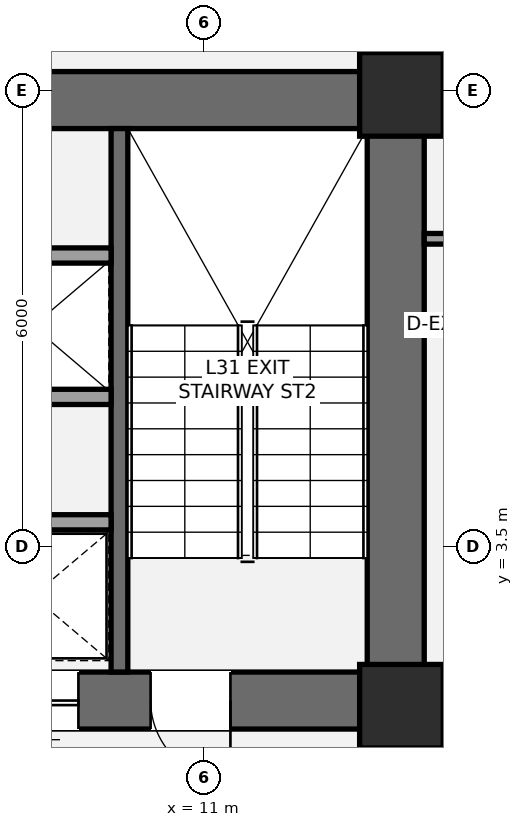
"""IFC4 building model, lengths in metres.
Left out: names, types, materials, properties, quantities, classifications, styles, units other than length and angle.
Written with IfcOpenShell. Run it as: python <this file> out.ifc"""

import sys

from ifc_helpers import new_model, si_unit, direction, frame, frame_2d, origin, origin_2d, place, context, subcontext, project, spatial, rectangle, extrude, element, fill, save


model = new_model("IFC4")
c1 = context("Model", 3, precision=1e-05, world=origin(), true_north=direction((0.0, 1.0)))
c2 = subcontext(c1, "Body", "Model", "MODEL_VIEW")
j1 = project(units=[si_unit("LENGTHUNIT", "METRE"), si_unit("PLANEANGLEUNIT", "RADIAN")], contexts=[c1])
p1 = place(None, origin())
s1 = spatial("IfcSite", under=j1, at=p1, CompositionType="ELEMENT")
p2 = place(p1, origin())
s2 = spatial("IfcBuilding", under=s1, at=p2, CompositionType="ELEMENT")
p3 = place(p2, frame((0.0, 0.0, 117.6)))
s3 = spatial("IfcBuildingStorey", under=s2, at=p3, CompositionType="ELEMENT", Elevation=117.6)
p4 = place(p3, frame((13.525, 1.1, 0.0), z_axis=(0.0, 0.0, 1.0), x_axis=(0.0, 1.0, 0.0)))
e1 = element("IfcWall", 1, at=p4, inside=s3, PredefinedType="SHEAR", context=c2, shape_type="SweptSolid", body=[
    extrude(rectangle(XDim=8.65, YDim=0.75, at=frame_2d((4.325, 0.0))), origin(), (0.0, 0.0, 1.0), 3.5),
])
p5 = place(p3, frame((4.425, 9.375, 0.0), z_axis=(0.0, 0.0, 1.0), x_axis=(1.0, 0.0, 0.0)))
e2 = element("IfcWall", 2, at=p5, inside=s3, PredefinedType="SHEAR", context=c2, shape_type="SweptSolid", body=[
    extrude(rectangle(XDim=9.475, YDim=0.75, at=frame_2d((4.737, 0.0))), origin(), (0.0, 0.0, 1.0), 3.5),
])
p6 = place(p3, frame((13.9, 1.475, 0.0), z_axis=(0.0, 0.0, 1.0), x_axis=(-1.0, 0.0, 0.0)))
e3 = element("IfcWall", 3, at=p6, inside=s3, PredefinedType="SHEAR", context=c2, shape_type="SweptSolid", body=[
    extrude(rectangle(XDim=9.075, YDim=0.75, at=frame_2d((4.538, 0.0))), origin(), (0.0, 0.0, 1.0), 3.5),
])
p7 = place(p6, frame((2.55, 0.0, 0.0)))
e4 = element("IfcOpeningElement", 4, at=p7, cuts=e3, PredefinedType="OPENING", context=c2, shape_type="SweptSolid", body=[
    extrude(rectangle(XDim=1.05, YDim=2.15, at=frame_2d((0.525, 1.075))), frame((0.0, 0.385, 0.0), z_axis=(0.0, -1.0, 0.0), x_axis=(1.0, 0.0, 0.0)), (0.0, 0.0, 1.0), 0.77),
])
p8 = place(p6, frame((4.55, 0.0, 0.0)))
e5 = element("IfcOpeningElement", 5, at=p8, cuts=e3, PredefinedType="OPENING", context=c2, shape_type="SweptSolid", body=[
    extrude(rectangle(XDim=1.1, YDim=2.2, at=frame_2d((0.55, 1.1))), frame((0.0, 0.385, 0.0), z_axis=(0.0, -1.0, 0.0), x_axis=(1.0, 0.0, 0.0)), (0.0, 0.0, 1.0), 0.77),
])
p9 = place(p3, frame((9.89, 1.85, 0.0), z_axis=(0.0, 0.0, 1.0), x_axis=(0.0, 1.0, 0.0)))
e6 = element("IfcWall", 6, at=p9, inside=s3, PredefinedType="SHEAR", context=c2, shape_type="SweptSolid", body=[
    extrude(rectangle(XDim=7.15, YDim=0.22, at=frame_2d((3.575, 0.0))), origin(), (0.0, 0.0, 1.0), 3.5),
])
for number, where, z_axis, x_axis in (
    (7, (13.6, 1.4, 0.0), (0.0, 0.0, 1.0), (1.0, 0.0, 0.0)),
    (8, (13.6, 9.45, 0.0), (0.0, 0.0, 1.0), (1.0, 0.0, 0.0)),
):
    element("IfcColumn", number, at=place(p3, frame(where, z_axis=z_axis, x_axis=x_axis)), inside=s3, PredefinedType="COLUMN", context=c2, shape_type="SweptSolid", body=[
        extrude(rectangle(XDim=1.1, YDim=1.1, at=origin_2d()), origin(), (0.0, 0.0, 1.0), 3.5),
    ])
p10 = place(p3, frame((13.45, -2.15, 0.0), z_axis=(0.0, 0.0, 1.0), x_axis=(0.0, 1.0, 0.0)))
e9 = element("IfcWall", 9, at=p10, inside=s3, PredefinedType="PARTITIONING", context=c2, shape_type="SweptSolid", body=[
    extrude(rectangle(XDim=3.3, YDim=0.165, at=frame_2d((1.65, 0.0))), origin(), (0.0, 0.0, 1.0), 2.763),
])
p11 = place(p10, frame((1.15, 0.0, 0.0)))
e10 = element("IfcOpeningElement", 10, at=p11, cuts=e9, PredefinedType="OPENING", context=c2, shape_type="SweptSolid", body=[
    extrude(rectangle(XDim=1.05, YDim=2.15, at=frame_2d((0.525, 1.075))), frame((0.0, 0.093, 0.0), z_axis=(0.0, -1.0, 0.0), x_axis=(1.0, 0.0, 0.0)), (0.0, 0.0, 1.0), 0.185),
])
p12 = place(p3, frame((5.575, 3.82, 0.0), z_axis=(0.0, 0.0, 1.0), x_axis=(1.0, 0.0, 0.0)))
e11 = element("IfcWall", 11, at=p12, inside=s3, PredefinedType="SOLIDWALL", context=c2, shape_type="SweptSolid", body=[
    extrude(rectangle(XDim=4.205, YDim=0.2, at=frame_2d((2.103, 0.0))), origin(), (0.0, 0.0, 1.0), 3.31),
])
p13 = place(p12, frame((0.65, 0.0, 0.0)))
e12 = element("IfcOpeningElement", 12, at=p13, cuts=e11, PredefinedType="OPENING", context=c2, shape_type="SweptSolid", body=[
    extrude(rectangle(XDim=1.2, YDim=2.2, at=frame_2d((0.6, 1.1))), frame((0.0, 0.11, 0.0), z_axis=(0.0, -1.0, 0.0), x_axis=(1.0, 0.0, 0.0)), (0.0, 0.0, 1.0), 0.22),
])
for number, where, z_axis, x_axis in (
    (13, (5.575, 5.47, 0.0), (0.0, 0.0, 1.0), (1.0, 0.0, 0.0)),
    (14, (5.575, 7.33, 0.0), (0.0, 0.0, 1.0), (1.0, 0.0, 0.0)),
):
    element("IfcWall", number, at=place(p3, frame(where, z_axis=z_axis, x_axis=x_axis)), inside=s3, PredefinedType="SOLIDWALL", context=c2, shape_type="SweptSolid", body=[
        extrude(rectangle(XDim=4.205, YDim=0.2, at=frame_2d((2.103, 0.0))), origin(), (0.0, 0.0, 1.0), 3.31),
    ])
p14 = place(p3, frame((13.9, 7.55, 0.0), z_axis=(0.0, 0.0, 1.0), x_axis=(1.0, 0.0, 0.0)))
e15 = element("IfcWall", 15, at=p14, inside=s3, PredefinedType="PARTITIONING", context=c2, shape_type="SweptSolid", body=[
    extrude(rectangle(XDim=3.9, YDim=0.14, at=frame_2d((1.95, 0.0))), origin(), (0.0, 0.0, 1.0), 2.763),
])
p15 = place(p14, frame((0.32, 0.0, 0.0)))
e16 = element("IfcOpeningElement", 16, at=p15, cuts=e15, PredefinedType="OPENING", context=c2, shape_type="SweptSolid", body=[
    extrude(rectangle(XDim=0.92, YDim=2.15, at=frame_2d((0.46, 1.075))), frame((0.0, 0.08, 0.0), z_axis=(0.0, -1.0, 0.0), x_axis=(1.0, 0.0, 0.0)), (0.0, 0.0, 1.0), 0.16),
])
p16 = place(p7, origin())
e17 = element("IfcDoor", 17, at=p16, inside=s3, OperationType="SINGLE_SWING_LEFT", PredefinedType="DOOR", context=c2, shape_type="SweptSolid", body=[
    extrude(rectangle(XDim=1.05, YDim=2.15, at=frame_2d((0.525, 1.075))), frame((0.0, 0.025, 0.0), z_axis=(0.0, -1.0, 0.0), x_axis=(1.0, 0.0, 0.0)), (0.0, 0.0, 1.0), 0.05),
])
fill(e4, e17)
p17 = place(p8, origin())
e18 = element("IfcDoor", 18, at=p17, inside=s3, OperationType="SLIDING_TO_LEFT", PredefinedType="DOOR", context=c2, shape_type="SweptSolid", body=[
    extrude(rectangle(XDim=1.1, YDim=2.2, at=frame_2d((0.55, 1.1))), frame((0.0, 0.025, 0.0), z_axis=(0.0, -1.0, 0.0), x_axis=(1.0, 0.0, 0.0)), (0.0, 0.0, 1.0), 0.05),
])
fill(e5, e18)
save(model, sys.argv[1])
